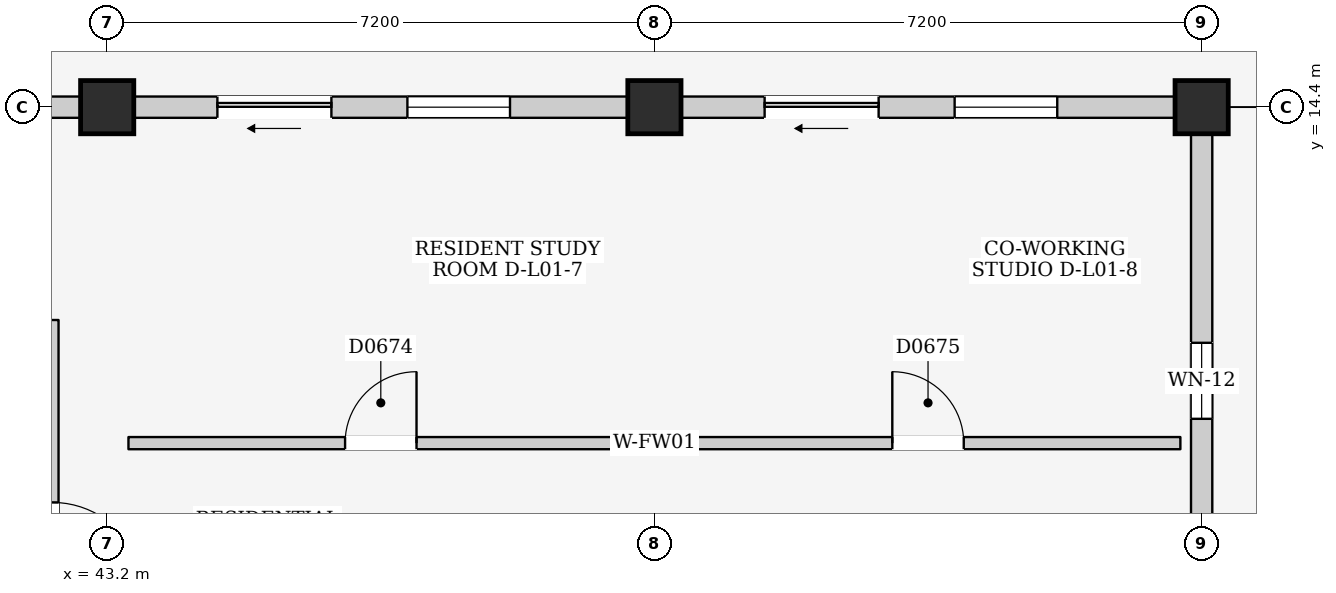
"""IFC4 building model, lengths in metres.
Left out: names, types, materials, properties, quantities, classifications, styles, units other than length and angle.
Written with IfcOpenShell. Run it as: python <this file> out.ifc"""

import sys

from ifc_helpers import new_model, si_unit, direction, frame, frame_2d, origin, origin_2d, place, context, subcontext, project, spatial, rectangle, extrude, element, fill, save


model = new_model("IFC4")
c1 = context("Model", 3, precision=1e-05, world=origin(), true_north=direction((0.0, 1.0)))
c2 = subcontext(c1, "Body", "Model", "MODEL_VIEW")
j1 = project(units=[si_unit("LENGTHUNIT", "METRE"), si_unit("PLANEANGLEUNIT", "RADIAN")], contexts=[c1])
p1 = place(None, origin())
s1 = spatial("IfcSite", under=j1, at=p1, CompositionType="ELEMENT")
p2 = place(p1, origin())
s2 = spatial("IfcBuilding", under=s1, at=p2, CompositionType="ELEMENT")
p3 = place(p2, frame((0.0, 0.0, 4.5)))
s3 = spatial("IfcBuildingStorey", under=s2, at=p3, CompositionType="ELEMENT", Elevation=4.5)
for number, where, z_axis, x_axis in (
    (1, (43.2, 14.4, 0.0), (0.0, 0.0, 1.0), (1.0, 0.0, 0.0)),
    (2, (50.4, 14.4, 0.0), (0.0, 0.0, 1.0), (1.0, 0.0, 0.0)),
    (3, (57.6, 14.4, 0.0), (0.0, 0.0, 1.0), (1.0, 0.0, 0.0)),
):
    element("IfcColumn", number, at=place(p3, frame(where, z_axis=z_axis, x_axis=x_axis)), inside=s3, PredefinedType="COLUMN", context=c2, shape_type="SweptSolid", body=[
        extrude(rectangle(XDim=0.7, YDim=0.7, at=origin_2d()), origin(), (0.0, 0.0, 1.0), 4.5),
    ])
p4 = place(p3, frame((36.35, 14.4, 0.0), z_axis=(0.0, 0.0, 1.0), x_axis=(1.0, 0.0, 0.0)))
e4 = element("IfcWall", 4, at=p4, inside=s3, PredefinedType="ELEMENTEDWALL", context=c2, shape_type="SweptSolid", body=[
    extrude(rectangle(XDim=6.5, YDim=0.28, at=frame_2d((3.25, 0.0))), origin(), (0.0, 0.0, 1.0), 3.635),
])
p5 = place(p4, frame((2.75, 0.0, 1.2)))
e5 = element("IfcOpeningElement", 5, at=p5, cuts=e4, PredefinedType="OPENING", context=c2, shape_type="SweptSolid", body=[
    extrude(rectangle(XDim=1.0, YDim=0.9, at=frame_2d((0.5, 0.45))), frame((0.0, 0.155, 0.0), z_axis=(0.0, -1.0, 0.0), x_axis=(1.0, 0.0, 0.0)), (0.0, 0.0, 1.0), 0.31),
])
p6 = place(p3, frame((43.55, 14.4, 0.0), z_axis=(0.0, 0.0, 1.0), x_axis=(1.0, 0.0, 0.0)))
e6 = element("IfcWall", 6, at=p6, inside=s3, PredefinedType="ELEMENTEDWALL", context=c2, shape_type="SweptSolid", body=[
    extrude(rectangle(XDim=6.5, YDim=0.28, at=frame_2d((3.25, 0.0))), origin(), (0.0, 0.0, 1.0), 3.635),
])
p7 = place(p6, frame((1.1, 0.0, 0.0)))
e7 = element("IfcOpeningElement", 7, at=p7, cuts=e6, PredefinedType="OPENING", context=c2, shape_type="SweptSolid", body=[
    extrude(rectangle(XDim=1.5, YDim=2.12, at=frame_2d((0.75, 1.06))), frame((0.0, 0.155, 0.0), z_axis=(0.0, -1.0, 0.0), x_axis=(1.0, 0.0, 0.0)), (0.0, 0.0, 1.0), 0.31),
])
p8 = place(p6, frame((3.6, 0.0, 0.95)))
e8 = element("IfcOpeningElement", 8, at=p8, cuts=e6, PredefinedType="OPENING", context=c2, shape_type="SweptSolid", body=[
    extrude(rectangle(XDim=1.35, YDim=1.5, at=frame_2d((0.675, 0.75))), frame((0.0, 0.155, 0.0), z_axis=(0.0, -1.0, 0.0), x_axis=(1.0, 0.0, 0.0)), (0.0, 0.0, 1.0), 0.31),
])
p9 = place(p3, frame((50.75, 14.4, 0.0), z_axis=(0.0, 0.0, 1.0), x_axis=(1.0, 0.0, 0.0)))
e9 = element("IfcWall", 9, at=p9, inside=s3, PredefinedType="ELEMENTEDWALL", context=c2, shape_type="SweptSolid", body=[
    extrude(rectangle(XDim=6.5, YDim=0.28, at=frame_2d((3.25, 0.0))), origin(), (0.0, 0.0, 1.0), 3.635),
])
p10 = place(p9, frame((1.1, 0.0, 0.0)))
e10 = element("IfcOpeningElement", 10, at=p10, cuts=e9, PredefinedType="OPENING", context=c2, shape_type="SweptSolid", body=[
    extrude(rectangle(XDim=1.5, YDim=2.12, at=frame_2d((0.75, 1.06))), frame((0.0, 0.155, 0.0), z_axis=(0.0, -1.0, 0.0), x_axis=(1.0, 0.0, 0.0)), (0.0, 0.0, 1.0), 0.31),
])
p11 = place(p9, frame((3.6, 0.0, 0.95)))
e11 = element("IfcOpeningElement", 11, at=p11, cuts=e9, PredefinedType="OPENING", context=c2, shape_type="SweptSolid", body=[
    extrude(rectangle(XDim=1.35, YDim=1.5, at=frame_2d((0.675, 0.75))), frame((0.0, 0.155, 0.0), z_axis=(0.0, -1.0, 0.0), x_axis=(1.0, 0.0, 0.0)), (0.0, 0.0, 1.0), 0.31),
])
p12 = place(p3, frame((57.6, 7.55, 0.0), z_axis=(0.0, 0.0, 1.0), x_axis=(0.0, 1.0, 0.0)))
e12 = element("IfcWall", 12, at=p12, inside=s3, PredefinedType="ELEMENTEDWALL", context=c2, shape_type="SweptSolid", body=[
    extrude(rectangle(XDim=6.5, YDim=0.28, at=frame_2d((3.25, 0.0))), origin(), (0.0, 0.0, 1.0), 3.685),
])
p13 = place(p12, frame((2.75, 0.0, 1.1)))
e13 = element("IfcOpeningElement", 13, at=p13, cuts=e12, PredefinedType="OPENING", context=c2, shape_type="SweptSolid", body=[
    extrude(rectangle(XDim=1.0, YDim=0.9, at=frame_2d((0.5, 0.45))), frame((0.0, 0.155, 0.0), z_axis=(0.0, -1.0, 0.0), x_axis=(1.0, 0.0, 0.0)), (0.0, 0.0, 1.0), 0.31),
])
p14 = place(p3, frame((42.48, 7.28, 0.0), z_axis=(0.0, 0.0, 1.0), x_axis=(0.0, 1.0, 0.0)))
e14 = element("IfcWall", 14, at=p14, inside=s3, PredefinedType="PARTITIONING", context=c2, shape_type="SweptSolid", body=[
    extrude(rectangle(XDim=4.32, YDim=0.16, at=frame_2d((2.16, 0.0))), origin(), (0.0, 0.0, 1.0), 4.25),
])
p15 = place(p14, frame((0.72, 0.0, 0.0)))
e15 = element("IfcOpeningElement", 15, at=p15, cuts=e14, PredefinedType="OPENING", context=c2, shape_type="SweptSolid", body=[
    extrude(rectangle(XDim=1.2, YDim=2.2, at=frame_2d((0.6, 1.1))), frame((0.0, 0.095, 0.0), z_axis=(0.0, -1.0, 0.0), x_axis=(1.0, 0.0, 0.0)), (0.0, 0.0, 1.0), 0.19),
])
p16 = place(p3, frame((43.48, 9.98, 0.0), z_axis=(0.0, 0.0, 1.0), x_axis=(1.0, 0.0, 0.0)))
e16 = element("IfcWall", 16, at=p16, inside=s3, PredefinedType="PARTITIONING", context=c2, shape_type="SweptSolid", body=[
    extrude(rectangle(XDim=6.64, YDim=0.16, at=frame_2d((3.32, 0.0))), origin(), (0.0, 0.0, 1.0), 4.25),
])
p17 = place(p16, frame((2.85, 0.0, 0.0)))
e17 = element("IfcOpeningElement", 17, at=p17, cuts=e16, PredefinedType="OPENING", context=c2, shape_type="SweptSolid", body=[
    extrude(rectangle(XDim=0.94, YDim=2.12, at=frame_2d((0.47, 1.06))), frame((0.0, 0.095, 0.0), z_axis=(0.0, -1.0, 0.0), x_axis=(1.0, 0.0, 0.0)), (0.0, 0.0, 1.0), 0.19),
])
p18 = place(p3, frame((50.68, 9.98, 0.0), z_axis=(0.0, 0.0, 1.0), x_axis=(1.0, 0.0, 0.0)))
e18 = element("IfcWall", 18, at=p18, inside=s3, PredefinedType="PARTITIONING", context=c2, shape_type="SweptSolid", body=[
    extrude(rectangle(XDim=6.64, YDim=0.16, at=frame_2d((3.32, 0.0))), origin(), (0.0, 0.0, 1.0), 4.25),
])
p19 = place(p18, frame((2.85, 0.0, 0.0)))
e19 = element("IfcOpeningElement", 19, at=p19, cuts=e18, PredefinedType="OPENING", context=c2, shape_type="SweptSolid", body=[
    extrude(rectangle(XDim=0.94, YDim=2.12, at=frame_2d((0.47, 1.06))), frame((0.0, 0.095, 0.0), z_axis=(0.0, -1.0, 0.0), x_axis=(1.0, 0.0, 0.0)), (0.0, 0.0, 1.0), 0.19),
])
p20 = place(p7, frame((1.5, 0.0, 0.0), z_axis=(0.0, 0.0, 1.0), x_axis=(-1.0, 0.0, 0.0)))
e20 = element("IfcDoor", 20, at=p20, inside=s3, OperationType="SLIDING_TO_LEFT", PredefinedType="DOOR", context=c2, shape_type="SweptSolid", body=[
    extrude(rectangle(XDim=1.5, YDim=2.12, at=frame_2d((0.75, 1.06))), frame((0.0, 0.025, 0.0), z_axis=(0.0, -1.0, 0.0), x_axis=(1.0, 0.0, 0.0)), (0.0, 0.0, 1.0), 0.05),
])
fill(e7, e20)
p21 = place(p8, origin())
e21 = element("IfcWindow", 21, at=p21, inside=s3, PartitioningType="SINGLE_PANEL", PredefinedType="WINDOW", context=c2, shape_type="SweptSolid", body=[
    extrude(rectangle(XDim=1.35, YDim=1.5, at=frame_2d((0.675, 0.75))), frame((0.0, 0.03, 0.0), z_axis=(0.0, -1.0, 0.0), x_axis=(1.0, 0.0, 0.0)), (0.0, 0.0, 1.0), 0.06),
])
fill(e8, e21)
p22 = place(p10, frame((1.5, 0.0, 0.0), z_axis=(0.0, 0.0, 1.0), x_axis=(-1.0, 0.0, 0.0)))
e22 = element("IfcDoor", 22, at=p22, inside=s3, OperationType="SLIDING_TO_LEFT", PredefinedType="DOOR", context=c2, shape_type="SweptSolid", body=[
    extrude(rectangle(XDim=1.5, YDim=2.12, at=frame_2d((0.75, 1.06))), frame((0.0, 0.025, 0.0), z_axis=(0.0, -1.0, 0.0), x_axis=(1.0, 0.0, 0.0)), (0.0, 0.0, 1.0), 0.05),
])
fill(e10, e22)
p23 = place(p11, origin())
e23 = element("IfcWindow", 23, at=p23, inside=s3, PartitioningType="SINGLE_PANEL", PredefinedType="WINDOW", context=c2, shape_type="SweptSolid", body=[
    extrude(rectangle(XDim=1.35, YDim=1.5, at=frame_2d((0.675, 0.75))), frame((0.0, 0.03, 0.0), z_axis=(0.0, -1.0, 0.0), x_axis=(1.0, 0.0, 0.0)), (0.0, 0.0, 1.0), 0.06),
])
fill(e11, e23)
p24 = place(p13, origin())
e24 = element("IfcWindow", 24, at=p24, inside=s3, PartitioningType="SINGLE_PANEL", PredefinedType="WINDOW", context=c2, shape_type="SweptSolid", body=[
    extrude(rectangle(XDim=1.0, YDim=0.9, at=frame_2d((0.5, 0.45))), frame((0.0, 0.03, 0.0), z_axis=(0.0, -1.0, 0.0), x_axis=(1.0, 0.0, 0.0)), (0.0, 0.0, 1.0), 0.06),
])
fill(e13, e24)
p25 = place(p15, frame((1.2, 0.0, 0.0), z_axis=(0.0, 0.0, 1.0), x_axis=(-1.0, 0.0, 0.0)))
e25 = element("IfcDoor", 25, at=p25, inside=s3, OperationType="SINGLE_SWING_RIGHT", PredefinedType="DOOR", context=c2, shape_type="SweptSolid", body=[
    extrude(rectangle(XDim=1.2, YDim=2.2, at=frame_2d((0.6, 1.1))), frame((0.0, 0.025, 0.0), z_axis=(0.0, -1.0, 0.0), x_axis=(1.0, 0.0, 0.0)), (0.0, 0.0, 1.0), 0.05),
])
fill(e15, e25)
p26 = place(p17, origin())
e26 = element("IfcDoor", 26, at=p26, inside=s3, OperationType="SINGLE_SWING_RIGHT", PredefinedType="DOOR", context=c2, shape_type="SweptSolid", body=[
    extrude(rectangle(XDim=0.94, YDim=2.12, at=frame_2d((0.47, 1.06))), frame((0.0, 0.025, 0.0), z_axis=(0.0, -1.0, 0.0), x_axis=(1.0, 0.0, 0.0)), (0.0, 0.0, 1.0), 0.05),
])
fill(e17, e26)
p27 = place(p19, origin())
e27 = element("IfcDoor", 27, at=p27, inside=s3, OperationType="SINGLE_SWING_LEFT", PredefinedType="DOOR", context=c2, shape_type="SweptSolid", body=[
    extrude(rectangle(XDim=0.94, YDim=2.12, at=frame_2d((0.47, 1.06))), frame((0.0, 0.025, 0.0), z_axis=(0.0, -1.0, 0.0), x_axis=(1.0, 0.0, 0.0)), (0.0, 0.0, 1.0), 0.05),
])
fill(e19, e27)
save(model, sys.argv[1])
